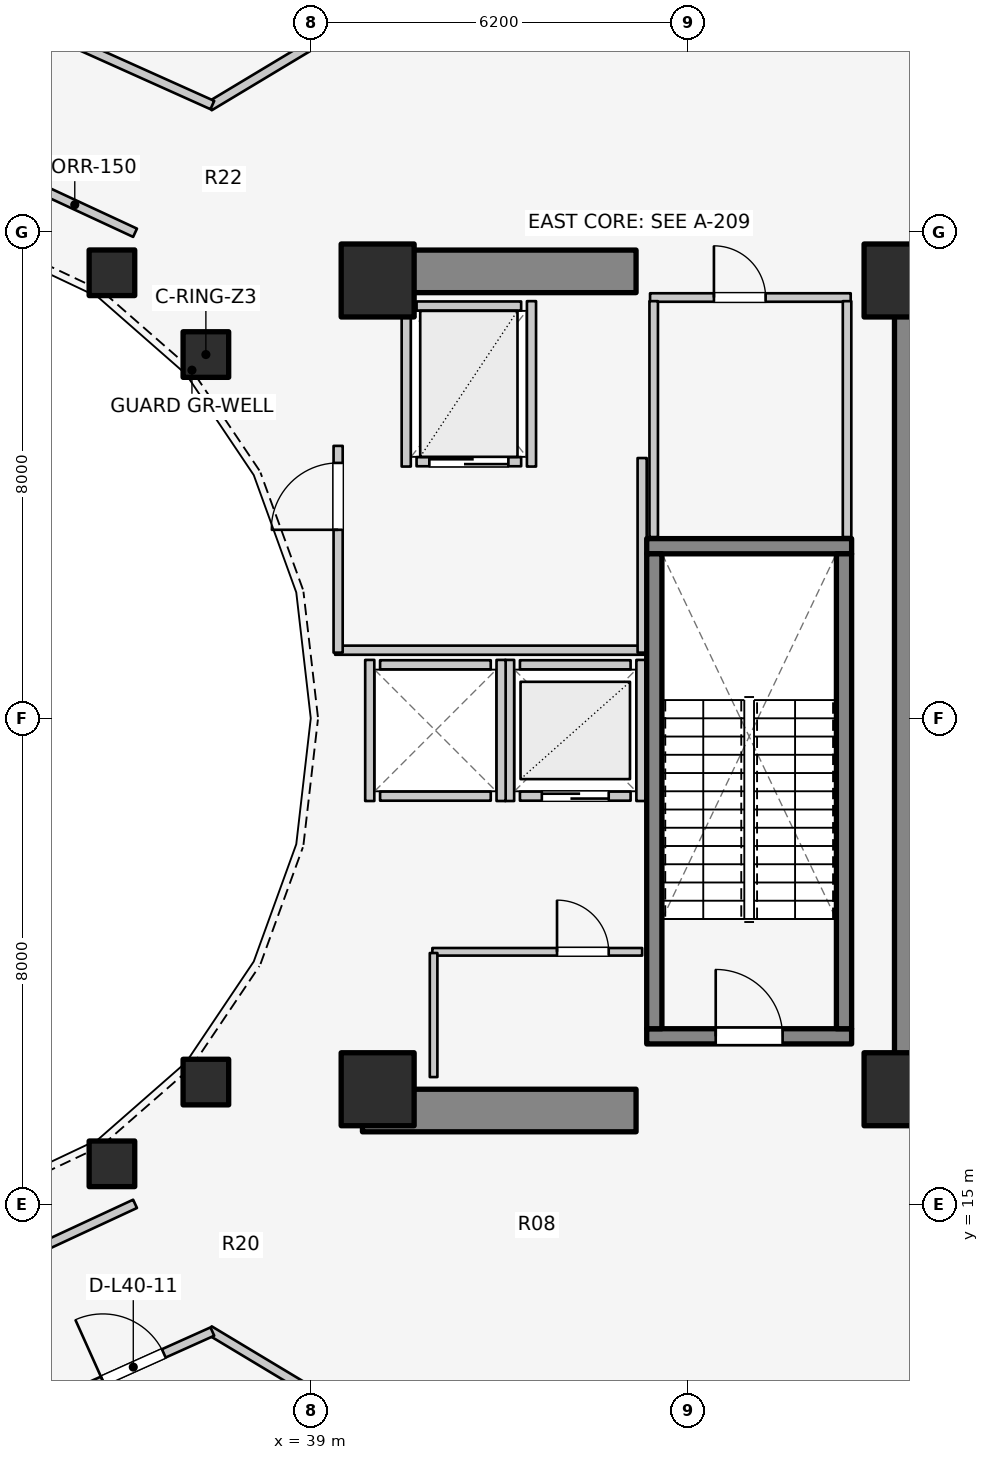
"""IFC4 building model, lengths in metres.
Left out: names, types, materials, properties, quantities, classifications, styles, units other than length and angle.
Written with IfcOpenShell. Run it as: python <this file> out.ifc"""

import sys

from ifc_helpers import new_model, si_unit, direction, frame, frame_2d, origin, origin_2d, place, context, subcontext, project, spatial, rectangle, extrude, element, fill, save


model = new_model("IFC4")
c1 = context("Model", 3, precision=1e-05, world=origin(), true_north=direction((0.0, 1.0)))
c2 = subcontext(c1, "Body", "Model", "MODEL_VIEW")
j1 = project(units=[si_unit("LENGTHUNIT", "METRE"), si_unit("PLANEANGLEUNIT", "RADIAN")], contexts=[c1])
p1 = place(None, origin())
s1 = spatial("IfcSite", under=j1, at=p1, CompositionType="ELEMENT")
p2 = place(p1, origin())
s2 = spatial("IfcBuilding", under=s1, at=p2, CompositionType="ELEMENT")
p3 = place(p2, frame((0.0, 0.0, 133.2)))
s3 = spatial("IfcBuildingStorey", under=s2, at=p3, CompositionType="ELEMENT", Elevation=133.2)
p4 = place(p3, frame((48.95, 17.05, 0.0), z_axis=(0.0, 0.0, 1.0), x_axis=(0.0, 1.0, 0.0)))
e1 = element("IfcWall", 1, at=p4, inside=s3, PredefinedType="SHEAR", context=c2, shape_type="SweptSolid", body=[
    extrude(rectangle(XDim=12.8, YDim=0.7, at=frame_2d((6.4, 0.0))), origin(), (0.0, 0.0, 1.0), 4.2),
])
for number, where, z_axis, x_axis in (
    (2, (39.85, 16.55, 0.0), (0.0, 0.0, 1.0), (1.0, 0.0, 0.0)),
    (3, (39.85, 30.35, 0.0), (0.0, 0.0, 1.0), (1.0, 0.0, 0.0)),
):
    element("IfcWall", number, at=place(p3, frame(where, z_axis=z_axis, x_axis=x_axis)), inside=s3, PredefinedType="SHEAR", context=c2, shape_type="SweptSolid", body=[
        extrude(rectangle(XDim=4.5, YDim=0.7, at=frame_2d((2.25, 0.0))), origin(), (0.0, 0.0, 1.0), 4.2),
    ])
p5 = place(p3, frame((44.525, 17.77, 0.0), z_axis=(0.0, 0.0, 1.0), x_axis=(1.0, 0.0, 0.0)))
e4 = element("IfcWall", 4, at=p5, inside=s3, PredefinedType="SOLIDWALL", context=c2, shape_type="SweptSolid", body=[
    extrude(rectangle(XDim=3.37, YDim=0.25, at=frame_2d((1.685, 0.0))), origin(), (0.0, 0.0, 1.0), 4.2),
])
p6 = place(p5, frame((1.135, 0.0, 0.0)))
e5 = element("IfcOpeningElement", 5, at=p6, cuts=e4, PredefinedType="OPENING", context=c2, shape_type="SweptSolid", body=[
    extrude(rectangle(XDim=1.1, YDim=2.1, at=frame_2d((0.55, 1.05))), frame((0.0, 0.135, 0.0), z_axis=(0.0, -1.0, 0.0), x_axis=(1.0, 0.0, 0.0)), (0.0, 0.0, 1.0), 0.27),
])
p7 = place(p3, frame((44.525, 25.83, 0.0), z_axis=(0.0, 0.0, 1.0), x_axis=(1.0, 0.0, 0.0)))
e6 = element("IfcWall", 6, at=p7, inside=s3, PredefinedType="SOLIDWALL", context=c2, shape_type="SweptSolid", body=[
    extrude(rectangle(XDim=3.37, YDim=0.25, at=frame_2d((1.685, 0.0))), origin(), (0.0, 0.0, 1.0), 4.2),
])
for number, where, z_axis, x_axis in (
    (7, (44.65, 17.895, 0.0), (0.0, 0.0, 1.0), (0.0, 1.0, 0.0)),
    (8, (47.77, 17.895, 0.0), (0.0, 0.0, 1.0), (0.0, 1.0, 0.0)),
):
    element("IfcWall", number, at=place(p3, frame(where, z_axis=z_axis, x_axis=x_axis)), inside=s3, PredefinedType="SOLIDWALL", context=c2, shape_type="SweptSolid", body=[
        extrude(rectangle(XDim=7.81, YDim=0.25, at=frame_2d((3.905, 0.0))), origin(), (0.0, 0.0, 1.0), 4.2),
    ])
for number, where, z_axis, x_axis in (
    (9, (40.1, 16.9, 0.0), (0.0, 0.0, 1.0), (1.0, 0.0, 0.0)),
    (10, (48.7, 16.9, 0.0), (0.0, 0.0, 1.0), (1.0, 0.0, 0.0)),
    (11, (48.7, 30.2, 0.0), (0.0, 0.0, 1.0), (1.0, 0.0, 0.0)),
    (12, (40.1, 30.2, 0.0), (0.0, 0.0, 1.0), (1.0, 0.0, 0.0)),
):
    element("IfcColumn", number, at=place(p3, frame(where, z_axis=z_axis, x_axis=x_axis)), inside=s3, PredefinedType="COLUMN", context=c2, shape_type="SweptSolid", body=[
        extrude(rectangle(XDim=1.2, YDim=1.2, at=origin_2d()), origin(), (0.0, 0.0, 1.0), 4.2),
    ])
for number, where, z_axis, x_axis in (
    (13, (37.275, 28.982, 0.0), (0.0, 0.0, 1.0), (1.0, 0.0, 0.0)),
    (14, (35.73, 30.327, 0.0), (0.0, 0.0, 1.0), (1.0, 0.0, 0.0)),
    (15, (35.73, 15.673, 0.0), (0.0, 0.0, 1.0), (1.0, 0.0, 0.0)),
    (16, (37.275, 17.018, 0.0), (0.0, 0.0, 1.0), (1.0, 0.0, 0.0)),
):
    element("IfcColumn", number, at=place(p3, frame(where, z_axis=z_axis, x_axis=x_axis)), inside=s3, PredefinedType="COLUMN", context=c2, shape_type="SweptSolid", body=[
        extrude(rectangle(XDim=0.75, YDim=0.75, at=origin_2d()), origin(), (0.0, 0.0, 1.0), 4.2),
    ])
p8 = place(p3, frame((42.44, 21.72, 0.0), z_axis=(0.0, 0.0, 1.0), x_axis=(1.0, 0.0, 0.0)))
e17 = element("IfcWall", 17, at=p8, inside=s3, PredefinedType="SOLIDWALL", context=c2, shape_type="SweptSolid", body=[
    extrude(rectangle(XDim=1.82, YDim=0.15, at=frame_2d((0.91, 0.0))), origin(), (0.0, 0.0, 1.0), 3.675),
])
p9 = place(p8, frame((0.36, 0.0, 0.0)))
e18 = element("IfcOpeningElement", 18, at=p9, cuts=e17, PredefinedType="OPENING", context=c2, shape_type="SweptSolid", body=[
    extrude(rectangle(XDim=1.1, YDim=2.1, at=frame_2d((0.55, 1.05))), frame((0.0, 0.085, 0.0), z_axis=(0.0, -1.0, 0.0), x_axis=(1.0, 0.0, 0.0)), (0.0, 0.0, 1.0), 0.17),
])
p10 = place(p3, frame((42.44, 23.88, 0.0), z_axis=(0.0, 0.0, 1.0), x_axis=(1.0, 0.0, 0.0)))
e19 = element("IfcWall", 19, at=p10, inside=s3, PredefinedType="SOLIDWALL", context=c2, shape_type="SweptSolid", body=[
    extrude(rectangle(XDim=1.82, YDim=0.15, at=frame_2d((0.91, 0.0))), origin(), (0.0, 0.0, 1.0), 3.675),
])
for number, where, z_axis, x_axis in (
    (20, (42.27, 21.64, 0.0), (0.0, 0.0, 1.0), (0.0, 1.0, 0.0)),
    (21, (44.43, 21.64, 0.0), (0.0, 0.0, 1.0), (0.0, 1.0, 0.0)),
):
    element("IfcWall", number, at=place(p3, frame(where, z_axis=z_axis, x_axis=x_axis)), inside=s3, PredefinedType="SOLIDWALL", context=c2, shape_type="SweptSolid", body=[
        extrude(rectangle(XDim=2.32, YDim=0.15, at=frame_2d((1.16, 0.0))), origin(), (0.0, 0.0, 1.0), 3.675),
    ])
for number, where, z_axis, x_axis in (
    (22, (40.14, 21.72, 0.0), (0.0, 0.0, 1.0), (1.0, 0.0, 0.0)),
    (23, (40.14, 23.88, 0.0), (0.0, 0.0, 1.0), (1.0, 0.0, 0.0)),
):
    element("IfcWall", number, at=place(p3, frame(where, z_axis=z_axis, x_axis=x_axis)), inside=s3, PredefinedType="SOLIDWALL", context=c2, shape_type="SweptSolid", body=[
        extrude(rectangle(XDim=1.82, YDim=0.15, at=frame_2d((0.91, 0.0))), origin(), (0.0, 0.0, 1.0), 3.22),
    ])
p11 = place(p3, frame((39.97, 21.64, 0.0), z_axis=(0.0, 0.0, 1.0), x_axis=(0.0, 1.0, 0.0)))
e24 = element("IfcWall", 24, at=p11, inside=s3, PredefinedType="SOLIDWALL", context=c2, shape_type="SweptSolid", body=[
    extrude(rectangle(XDim=2.32, YDim=0.15, at=frame_2d((1.16, 0.0))), origin(), (0.0, 0.0, 1.0), 3.22),
])
p12 = place(p3, frame((42.13, 21.64, 0.0), z_axis=(0.0, 0.0, 1.0), x_axis=(0.0, 1.0, 0.0)))
e25 = element("IfcWall", 25, at=p12, inside=s3, PredefinedType="SOLIDWALL", context=c2, shape_type="SweptSolid", body=[
    extrude(rectangle(XDim=2.32, YDim=0.15, at=frame_2d((1.16, 0.0))), origin(), (0.0, 0.0, 1.0), 3.675),
])
p13 = place(p3, frame((40.74, 27.22, 0.0), z_axis=(0.0, 0.0, 1.0), x_axis=(1.0, 0.0, 0.0)))
e26 = element("IfcWall", 26, at=p13, inside=s3, PredefinedType="SOLIDWALL", context=c2, shape_type="SweptSolid", body=[
    extrude(rectangle(XDim=1.72, YDim=0.15, at=frame_2d((0.86, 0.0))), origin(), (0.0, 0.0, 1.0), 3.675),
])
p14 = place(p13, frame((0.21, 0.0, 0.0)))
e27 = element("IfcOpeningElement", 27, at=p14, cuts=e26, PredefinedType="OPENING", context=c2, shape_type="SweptSolid", body=[
    extrude(rectangle(XDim=1.3, YDim=2.1, at=frame_2d((0.65, 1.05))), frame((0.0, 0.085, 0.0), z_axis=(0.0, -1.0, 0.0), x_axis=(1.0, 0.0, 0.0)), (0.0, 0.0, 1.0), 0.17),
])
p15 = place(p3, frame((40.74, 29.78, 0.0), z_axis=(0.0, 0.0, 1.0), x_axis=(1.0, 0.0, 0.0)))
e28 = element("IfcWall", 28, at=p15, inside=s3, PredefinedType="SOLIDWALL", context=c2, shape_type="SweptSolid", body=[
    extrude(rectangle(XDim=1.72, YDim=0.15, at=frame_2d((0.86, 0.0))), origin(), (0.0, 0.0, 1.0), 3.675),
])
for number, where, z_axis, x_axis in (
    (29, (40.57, 27.14, 0.0), (0.0, 0.0, 1.0), (0.0, 1.0, 0.0)),
    (30, (42.63, 27.14, 0.0), (0.0, 0.0, 1.0), (0.0, 1.0, 0.0)),
):
    element("IfcWall", number, at=place(p3, frame(where, z_axis=z_axis, x_axis=x_axis)), inside=s3, PredefinedType="SOLIDWALL", context=c2, shape_type="SweptSolid", body=[
        extrude(rectangle(XDim=2.72, YDim=0.15, at=frame_2d((1.36, 0.0))), origin(), (0.0, 0.0, 1.0), 3.675),
    ])
p16 = place(p3, frame((39.4, 24.12, 0.0), z_axis=(0.0, 0.0, 1.0), x_axis=(1.0, 0.0, 0.0)))
e31 = element("IfcWall", 31, at=p16, inside=s3, PredefinedType="PARTITIONING", context=c2, shape_type="SweptSolid", body=[
    extrude(rectangle(XDim=5.08, YDim=0.15, at=frame_2d((2.54, 0.0))), origin(), (0.0, 0.0, 1.0), 3.22),
])
p17 = place(p3, frame((44.45, 24.08, 0.0), z_axis=(0.0, 0.0, 1.0), x_axis=(0.0, 1.0, 0.0)))
e32 = element("IfcWall", 32, at=p17, inside=s3, PredefinedType="PARTITIONING", context=c2, shape_type="SweptSolid", body=[
    extrude(rectangle(XDim=3.2, YDim=0.15, at=frame_2d((1.6, 0.0))), origin(), (0.0, 0.0, 1.0), 3.675),
])
p18 = place(p3, frame((39.45, 24.08, 0.0), z_axis=(0.0, 0.0, 1.0), x_axis=(0.0, 1.0, 0.0)))
e33 = element("IfcWall", 33, at=p18, inside=s3, PredefinedType="PARTITIONING", context=c2, shape_type="SweptSolid", body=[
    extrude(rectangle(XDim=3.4, YDim=0.15, at=frame_2d((1.7, 0.0))), origin(), (0.0, 0.0, 1.0), 3.675),
])
p19 = place(p18, frame((2.02, 0.0, 0.0)))
e34 = element("IfcOpeningElement", 34, at=p19, cuts=e33, PredefinedType="OPENING", context=c2, shape_type="SweptSolid", body=[
    extrude(rectangle(XDim=1.1, YDim=2.1, at=frame_2d((0.55, 1.05))), frame((0.0, 0.085, 0.0), z_axis=(0.0, -1.0, 0.0), x_axis=(1.0, 0.0, 0.0)), (0.0, 0.0, 1.0), 0.17),
])
p20 = place(p3, frame((41.0, 19.16, 0.0), z_axis=(0.0, 0.0, 1.0), x_axis=(1.0, 0.0, 0.0)))
e35 = element("IfcWall", 35, at=p20, inside=s3, PredefinedType="PARTITIONING", context=c2, shape_type="SweptSolid", body=[
    extrude(rectangle(XDim=3.45, YDim=0.125, at=frame_2d((1.725, 0.0))), origin(), (0.0, 0.0, 1.0), 3.22),
])
p21 = place(p20, frame((2.05, 0.0, 0.0)))
e36 = element("IfcOpeningElement", 36, at=p21, cuts=e35, PredefinedType="OPENING", context=c2, shape_type="SweptSolid", body=[
    extrude(rectangle(XDim=0.85, YDim=2.05, at=frame_2d((0.425, 1.025))), frame((0.0, 0.073, 0.0), z_axis=(0.0, -1.0, 0.0), x_axis=(1.0, 0.0, 0.0)), (0.0, 0.0, 1.0), 0.145),
])
p22 = place(p3, frame((41.02, 17.1, 0.0), z_axis=(0.0, 0.0, 1.0), x_axis=(0.0, 1.0, 0.0)))
e37 = element("IfcWall", 37, at=p22, inside=s3, PredefinedType="PARTITIONING", context=c2, shape_type="SweptSolid", body=[
    extrude(rectangle(XDim=2.04, YDim=0.125, at=frame_2d((1.02, 0.0))), origin(), (0.0, 0.0, 1.0), 3.675),
])
for number, where, z_axis, x_axis in (
    (38, (36.11, 30.985, 0.0), (0.0, 0.0, 1.0), (-0.907, 0.421, 0.0)),
    (39, (34.127, 14.094, 0.0), (0.0, 0.0, 1.0), (0.907, 0.421, 0.0)),
):
    element("IfcWall", number, at=place(p3, frame(where, z_axis=z_axis, x_axis=x_axis)), inside=s3, PredefinedType="PARTITIONING", context=c2, shape_type="SweptSolid", body=[
        extrude(rectangle(XDim=2.186, YDim=0.15, at=frame_2d((1.093, 0.0))), origin(), (0.0, 0.0, 1.0), 2.32),
    ])
p23 = place(p3, frame((37.332, 33.063, 0.0), z_axis=(0.0, 0.0, 1.0), x_axis=(0.857109469509, 0.515134309941, 0.0)))
e40 = element("IfcWall", 40, at=p23, inside=s3, PredefinedType="PARTITIONING", context=c2, shape_type="SweptSolid", body=[
    extrude(rectangle(XDim=7.757, YDim=0.15, at=frame_2d((3.879, 0.0))), origin(), (0.0, 0.0, 1.0), 2.32),
])
p24 = place(p3, frame((37.382, 33.085, 0.0), z_axis=(0.0, 0.0, 1.0), x_axis=(-0.9121872495, 0.409773622687, 0.0)))
e41 = element("IfcWall", 41, at=p24, inside=s3, PredefinedType="PARTITIONING", context=c2, shape_type="SweptSolid", body=[
    extrude(rectangle(XDim=2.852, YDim=0.15, at=frame_2d((1.426, 0.0))), origin(), (0.0, 0.0, 1.0), 2.32),
])
p25 = place(p3, frame((37.332, 12.937, 0.0), z_axis=(0.0, 0.0, 1.0), x_axis=(0.857109469509, -0.515134309941, 0.0)))
e42 = element("IfcWall", 42, at=p25, inside=s3, PredefinedType="PARTITIONING", context=c2, shape_type="SweptSolid", body=[
    extrude(rectangle(XDim=7.757, YDim=0.15, at=frame_2d((3.879, 0.0))), origin(), (0.0, 0.0, 1.0), 2.32),
])
p26 = place(p3, frame((34.781, 11.746, 0.0), z_axis=(0.0, 0.0, 1.0), x_axis=(0.9121872495, 0.409773622687, 0.0)))
e43 = element("IfcWall", 43, at=p26, inside=s3, PredefinedType="PARTITIONING", context=c2, shape_type="SweptSolid", body=[
    extrude(rectangle(XDim=2.852, YDim=0.15, at=frame_2d((1.426, 0.0))), origin(), (0.0, 0.0, 1.0), 2.32),
])
p27 = place(p26, frame((0.876, 0.0, 0.0)))
e44 = element("IfcOpeningElement", 44, at=p27, cuts=e43, PredefinedType="OPENING", context=c2, shape_type="SweptSolid", body=[
    extrude(rectangle(XDim=1.1, YDim=2.1, at=frame_2d((0.55, 1.05))), frame((0.0, 0.085, 0.0), z_axis=(0.0, -1.0, 0.0), x_axis=(1.0, 0.0, 0.0)), (0.0, 0.0, 1.0), 0.17),
])
p28 = place(p3, frame((44.58, 29.92, 0.0), z_axis=(0.0, 0.0, 1.0), x_axis=(1.0, 0.0, 0.0)))
e45 = element("IfcWall", 45, at=p28, inside=s3, PredefinedType="PLUMBINGWALL", context=c2, shape_type="SweptSolid", body=[
    extrude(rectangle(XDim=3.3, YDim=0.14, at=frame_2d((1.65, 0.0))), origin(), (0.0, 0.0, 1.0), 3.675),
])
p29 = place(p28, frame((1.051, 0.0, 0.0)))
e46 = element("IfcOpeningElement", 46, at=p29, cuts=e45, PredefinedType="OPENING", context=c2, shape_type="SweptSolid", body=[
    extrude(rectangle(XDim=0.85, YDim=2.05, at=frame_2d((0.425, 1.025))), frame((0.0, 0.08, 0.0), z_axis=(0.0, -1.0, 0.0), x_axis=(1.0, 0.0, 0.0)), (0.0, 0.0, 1.0), 0.16),
])
for number, where, z_axis, x_axis in (
    (47, (44.64, 25.98, 0.0), (0.0, 0.0, 1.0), (0.0, 1.0, 0.0)),
    (48, (47.82, 25.98, 0.0), (0.0, 0.0, 1.0), (0.0, 1.0, 0.0)),
):
    element("IfcWall", number, at=place(p3, frame(where, z_axis=z_axis, x_axis=x_axis)), inside=s3, PredefinedType="PLUMBINGWALL", context=c2, shape_type="SweptSolid", body=[
        extrude(rectangle(XDim=3.88, YDim=0.14, at=frame_2d((1.94, 0.0))), origin(), (0.0, 0.0, 1.0), 3.675),
    ])
p30 = place(p6, origin())
e49 = element("IfcDoor", 49, at=p30, inside=s3, OperationType="SINGLE_SWING_LEFT", PredefinedType="DOOR", context=c2, shape_type="SweptSolid", body=[
    extrude(rectangle(XDim=1.1, YDim=2.1, at=frame_2d((0.55, 1.05))), frame((0.0, 0.025, 0.0), z_axis=(0.0, -1.0, 0.0), x_axis=(1.0, 0.0, 0.0)), (0.0, 0.0, 1.0), 0.05),
])
fill(e5, e49)
p31 = place(p9, origin())
e50 = element("IfcDoor", 50, at=p31, inside=s3, OperationType="DOUBLE_DOOR_SLIDING", PredefinedType="DOOR", context=c2, shape_type="SweptSolid", body=[
    extrude(rectangle(XDim=1.1, YDim=2.1, at=frame_2d((0.55, 1.05))), frame((0.0, 0.025, 0.0), z_axis=(0.0, -1.0, 0.0), x_axis=(1.0, 0.0, 0.0)), (0.0, 0.0, 1.0), 0.05),
])
fill(e18, e50)
p32 = place(p14, origin())
e51 = element("IfcDoor", 51, at=p32, inside=s3, OperationType="DOUBLE_DOOR_SLIDING", PredefinedType="DOOR", context=c2, shape_type="SweptSolid", body=[
    extrude(rectangle(XDim=1.3, YDim=2.1, at=frame_2d((0.65, 1.05))), frame((0.0, 0.025, 0.0), z_axis=(0.0, -1.0, 0.0), x_axis=(1.0, 0.0, 0.0)), (0.0, 0.0, 1.0), 0.05),
])
fill(e27, e51)
p33 = place(p19, origin())
e52 = element("IfcDoor", 52, at=p33, inside=s3, OperationType="SINGLE_SWING_LEFT", PredefinedType="DOOR", context=c2, shape_type="SweptSolid", body=[
    extrude(rectangle(XDim=1.1, YDim=2.1, at=frame_2d((0.55, 1.05))), frame((0.0, 0.025, 0.0), z_axis=(0.0, -1.0, 0.0), x_axis=(1.0, 0.0, 0.0)), (0.0, 0.0, 1.0), 0.05),
])
fill(e34, e52)
p34 = place(p21, origin())
e53 = element("IfcDoor", 53, at=p34, inside=s3, OperationType="SINGLE_SWING_LEFT", PredefinedType="DOOR", context=c2, shape_type="SweptSolid", body=[
    extrude(rectangle(XDim=0.85, YDim=2.05, at=frame_2d((0.425, 1.025))), frame((0.0, 0.025, 0.0), z_axis=(0.0, -1.0, 0.0), x_axis=(1.0, 0.0, 0.0)), (0.0, 0.0, 1.0), 0.05),
])
fill(e36, e53)
p35 = place(p27, origin())
e54 = element("IfcDoor", 54, at=p35, inside=s3, OperationType="SINGLE_SWING_LEFT", PredefinedType="DOOR", context=c2, shape_type="SweptSolid", body=[
    extrude(rectangle(XDim=1.1, YDim=2.1, at=frame_2d((0.55, 1.05))), frame((0.0, 0.025, 0.0), z_axis=(0.0, -1.0, 0.0), x_axis=(1.0, 0.0, 0.0)), (0.0, 0.0, 1.0), 0.05),
])
fill(e44, e54)
p36 = place(p29, origin())
e55 = element("IfcDoor", 55, at=p36, inside=s3, OperationType="SINGLE_SWING_LEFT", PredefinedType="DOOR", context=c2, shape_type="SweptSolid", body=[
    extrude(rectangle(XDim=0.85, YDim=2.05, at=frame_2d((0.425, 1.025))), frame((0.0, 0.025, 0.0), z_axis=(0.0, -1.0, 0.0), x_axis=(1.0, 0.0, 0.0)), (0.0, 0.0, 1.0), 0.05),
])
fill(e46, e55)
save(model, sys.argv[1])
